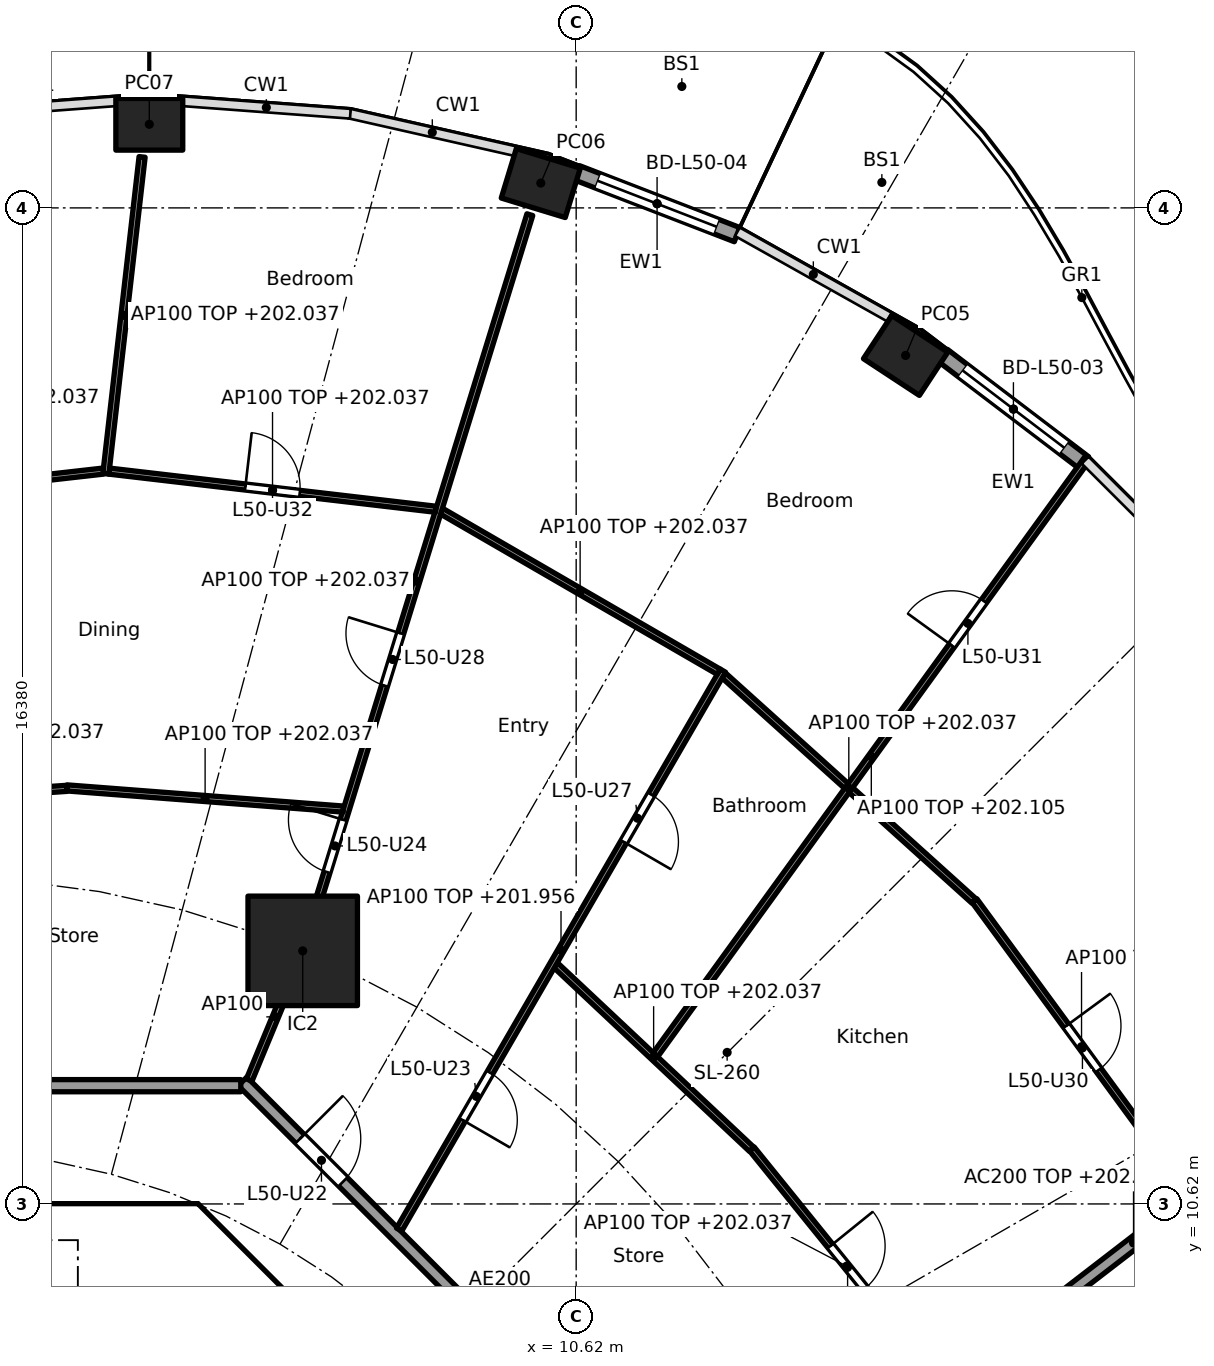
"""IFC4 building model, lengths in metres.
Left out: names, types, materials, properties, quantities, classifications, styles, units other than length and angle.
Written with IfcOpenShell. Run it as: python <this file> out.ifc"""

import sys

from ifc_helpers import new_model, si_unit, direction, frame, frame_2d, origin, origin_2d, place, context, subcontext, project, spatial, polyline, rectangle, hollow_rectangle, outline, extrude, element, fill, save


model = new_model("IFC4")
c1 = context("Model", 3, precision=1e-05, world=origin(), true_north=direction((0.0, 1.0)))
c2 = subcontext(c1, "Body", "Model", "MODEL_VIEW")
j1 = project(units=[si_unit("LENGTHUNIT", "METRE"), si_unit("PLANEANGLEUNIT", "RADIAN")], contexts=[c1])
p1 = place(None, origin())
s1 = spatial("IfcSite", under=j1, at=p1, CompositionType="ELEMENT")
p2 = place(p1, origin())
s2 = spatial("IfcBuilding", under=s1, at=p2, CompositionType="ELEMENT")
p3 = place(p2, frame((0.0, 0.0, 199.2)))
s3 = spatial("IfcBuildingStorey", under=s2, at=p3, CompositionType="ELEMENT", Elevation=199.2)
for number, where, z_axis, x_axis in (
    (1, (16.038, 24.573, 0.0), (0.0, 0.0, 1.0), (-0.836, 0.549, 0.0)),
    (2, (10.038, 27.408, 0.0), (0.0, 0.0, 1.0), (-0.957, 0.292, 0.0)),
    (3, (3.6, 28.375, 0.0), (0.0, 0.0, 1.0), (-1.0, 0.0, 0.0)),
):
    element("IfcColumn", number, at=place(p3, frame(where, z_axis=z_axis, x_axis=x_axis)), inside=s3, PredefinedType="COLUMN", context=c2, shape_type="SweptSolid", body=[
        extrude(hollow_rectangle(XDim=1.1, YDim=0.85, WallThickness=0.036, at=origin_2d()), origin(), (0.0, 0.0, 1.0), 3.7),
    ])
p4 = place(p3, frame((6.123, 14.782, 0.0), z_axis=(0.0, 0.0, 1.0), x_axis=(1.0, 0.0, 0.0)))
e4 = element("IfcColumn", 4, at=p4, inside=s3, PredefinedType="COLUMN", context=c2, shape_type="SweptSolid", body=[
    extrude(rectangle(XDim=1.8, YDim=1.8, at=origin_2d()), origin(), (0.0, 0.0, 1.0), 3.7),
])
p5 = place(p3, frame((16.65, 24.574, 0.0), z_axis=(0.0, 0.0, 1.0), x_axis=(0.796055733703, -0.60522332146, 0.0)))
e5 = element("IfcWall", 5, at=p5, inside=s3, PredefinedType="SOLIDWALL", context=c2, shape_type="SweptSolid", body=[
    extrude(rectangle(XDim=2.917, YDim=0.25, at=frame_2d((1.458, 0.0))), origin(), (0.0, 0.0, 1.0), 3.44),
])
p6 = place(p5, frame((0.408, 0.0, 0.0)))
e6 = element("IfcOpeningElement", 6, at=p6, cuts=e5, PredefinedType="OPENING", context=c2, shape_type="SweptSolid", body=[
    extrude(rectangle(XDim=2.1, YDim=2.4, at=frame_2d((1.05, 1.2))), frame((0.0, 0.135, 0.0), z_axis=(0.0, -1.0, 0.0), x_axis=(1.0, 0.0, 0.0)), (0.0, 0.0, 1.0), 0.27),
])
p7 = place(p3, frame((10.635, 27.576, 0.0), z_axis=(0.0, 0.0, 1.0), x_axis=(0.932806734513, -0.360377019311, 0.0)))
e7 = element("IfcWall", 7, at=p7, inside=s3, PredefinedType="SOLIDWALL", context=c2, shape_type="SweptSolid", body=[
    extrude(rectangle(XDim=2.82, YDim=0.25, at=frame_2d((1.41, 0.0))), origin(), (0.0, 0.0, 1.0), 3.44),
])
p8 = place(p7, frame((0.36, 0.0, 0.0)))
e8 = element("IfcOpeningElement", 8, at=p8, cuts=e7, PredefinedType="OPENING", context=c2, shape_type="SweptSolid", body=[
    extrude(rectangle(XDim=2.1, YDim=2.4, at=frame_2d((1.05, 1.2))), frame((0.0, 0.135, 0.0), z_axis=(0.0, -1.0, 0.0), x_axis=(1.0, 0.0, 0.0)), (0.0, 0.0, 1.0), 0.27),
])
p9 = place(p3, frame((9.988, 4.613, 0.0), z_axis=(0.0, 0.0, 1.0), x_axis=(-0.707106781187, 0.707106781187, 0.0)))
e9 = element("IfcWall", 9, at=p9, inside=s3, PredefinedType="SHEAR", context=c2, shape_type="SweptSolid", body=[
    extrude(rectangle(XDim=7.602, YDim=0.6, at=frame_2d((3.801, 0.0))), origin(), (0.0, 0.0, 1.0), 3.44),
])
p10 = place(p9, frame((3.201, 0.0, 0.0)))
e10 = element("IfcOpeningElement", 10, at=p10, cuts=e9, PredefinedType="OPENING", context=c2, shape_type="SweptSolid", body=[
    extrude(rectangle(XDim=1.2, YDim=2.1, at=frame_2d((0.6, 1.05))), frame((0.0, 0.31, 0.0), z_axis=(0.0, -1.0, 0.0), x_axis=(1.0, 0.0, 0.0)), (0.0, 0.0, 1.0), 0.62),
])
p11 = place(p3, frame((4.0, 7.025, 0.0), z_axis=(0.0, 0.0, 1.0), x_axis=(0.0, 1.0, 0.0)))
e11 = element("IfcWall", 11, at=p11, inside=s3, PredefinedType="SOLIDWALL", context=c2, shape_type="SweptSolid", body=[
    extrude(rectangle(XDim=3.0, YDim=0.2, at=frame_2d((1.5, 0.0))), origin(), (0.0, 0.0, 1.0), 3.44),
])
p12 = place(p11, frame((0.925, 0.0, 0.0)))
e12 = element("IfcOpeningElement", 12, at=p12, cuts=e11, PredefinedType="OPENING", context=c2, shape_type="SweptSolid", body=[
    extrude(rectangle(XDim=1.1, YDim=2.1, at=frame_2d((0.55, 1.05))), frame((0.0, 0.11, 0.0), z_axis=(0.0, -1.0, 0.0), x_axis=(1.0, 0.0, 0.0)), (0.0, 0.0, 1.0), 0.22),
])
p13 = place(p3, origin())
e13 = element("IfcWall", 13, at=p13, inside=s3, PredefinedType="SHEAR", context=c2, shape_type="SweptSolid", body=[
    extrude(outline(polyline([(-4.152, 10.025), (-4.401, 9.776), (-4.825, 10.2), (-4.401, 10.625), (4.401, 10.625), (4.825, 10.2), (4.401, 9.776), (4.152, 10.025), (-4.152, 10.025)])), origin(), (0.0, 0.0, 1.0), 3.44),
])
p14 = place(p3, frame((14.822, 6.154, 0.0), z_axis=(0.0, 0.0, 1.0), x_axis=(0.792203056092, 0.610257583254, 0.0)))
e14 = element("IfcWall", 14, at=p14, inside=s3, PredefinedType="PARTITIONING", context=c2, shape_type="SweptSolid", body=[
    extrude(rectangle(XDim=12.533, YDim=0.2, at=frame_2d((6.266, 0.0))), origin(), (0.0, 0.0, 1.0), 2.837),
])
p15 = place(p3, frame((12.635, 5.134, 0.0), z_axis=(0.0, 0.0, 1.0), x_axis=(-0.707106781187, 0.707106781187, 0.0)))
e15 = element("IfcWall", 15, at=p15, inside=s3, PredefinedType="PARTITIONING", context=c2, shape_type="SweptSolid", body=[
    extrude(rectangle(XDim=10.609, YDim=0.2, at=frame_2d((5.305, 0.0))), origin(), (0.0, 0.0, 1.0), 3.44),
])
p16 = place(p15, frame((8.274, 0.0, 0.0)))
e16 = element("IfcOpeningElement", 16, at=p16, cuts=e15, PredefinedType="OPENING", context=c2, shape_type="SweptSolid", body=[
    extrude(rectangle(XDim=1.0, YDim=2.1, at=frame_2d((0.5, 1.05))), frame((0.0, 0.11, 0.0), z_axis=(0.0, -1.0, 0.0), x_axis=(1.0, 0.0, 0.0)), (0.0, 0.0, 1.0), 0.22),
])
p17 = place(p3, frame((5.104, 12.565, 0.0), z_axis=(0.0, 0.0, 1.0), x_axis=(-1.0, 0.0, 0.0)))
e17 = element("IfcWall", 17, at=p17, inside=s3, PredefinedType="PARTITIONING", context=c2, shape_type="SweptSolid", body=[
    extrude(rectangle(XDim=10.409, YDim=0.2, at=frame_2d((5.205, 0.0))), origin(), (0.0, 0.0, 1.0), 3.44),
])
p18 = place(p3, frame((16.626, 7.67, 0.0), z_axis=(0.0, 0.0, 1.0), x_axis=(-0.628764602857, 0.777595700987, 0.0)))
e18 = element("IfcWall", 18, at=p18, inside=s3, PredefinedType="PARTITIONING", context=c2, shape_type="SweptSolid", body=[
    extrude(rectangle(XDim=4.957, YDim=0.1, at=frame_2d((2.479, 0.0))), origin(), (0.0, 0.0, 1.0), 2.837),
])
p19 = place(p18, frame((2.004, 0.0, 0.0)))
e19 = element("IfcOpeningElement", 19, at=p19, cuts=e18, PredefinedType="OPENING", context=c2, shape_type="SweptSolid", body=[
    extrude(rectangle(XDim=0.9, YDim=2.1, at=frame_2d((0.45, 1.05))), frame((0.0, 0.06, 0.0), z_axis=(0.0, -1.0, 0.0), x_axis=(1.0, 0.0, 0.0)), (0.0, 0.0, 1.0), 0.12),
])
p20 = place(p3, frame((20.692, 10.802, 0.0), z_axis=(0.0, 0.0, 1.0), x_axis=(-0.591122127251, 0.806582066918, 0.0)))
e20 = element("IfcWall", 20, at=p20, inside=s3, PredefinedType="PARTITIONING", context=c2, shape_type="SweptSolid", body=[
    extrude(rectangle(XDim=5.96, YDim=0.1, at=frame_2d((2.98, 0.0))), origin(), (0.0, 0.0, 1.0), 2.837),
])
p21 = place(p20, frame((2.505, 0.0, 0.0)))
e21 = element("IfcOpeningElement", 21, at=p21, cuts=e20, PredefinedType="OPENING", context=c2, shape_type="SweptSolid", body=[
    extrude(rectangle(XDim=0.9, YDim=2.1, at=frame_2d((0.45, 1.05))), frame((0.0, 0.06, 0.0), z_axis=(0.0, -1.0, 0.0), x_axis=(1.0, 0.0, 0.0)), (0.0, 0.0, 1.0), 0.12),
])
p22 = place(p3, frame((13.504, 11.52, 0.0), z_axis=(0.0, 0.0, 1.0), x_axis=(-0.728885663674, 0.684635442619, 0.0)))
e22 = element("IfcWall", 22, at=p22, inside=s3, PredefinedType="PARTITIONING", context=c2, shape_type="SweptSolid", body=[
    extrude(rectangle(XDim=4.419, YDim=0.1, at=frame_2d((2.21, 0.0))), origin(), (0.0, 0.0, 1.0), 2.837),
])
p23 = place(p3, frame((17.162, 15.603, 0.0), z_axis=(0.0, 0.0, 1.0), x_axis=(-0.742790086539, 0.66952437397, 0.0)))
e23 = element("IfcWall", 23, at=p23, inside=s3, PredefinedType="PARTITIONING", context=c2, shape_type="SweptSolid", body=[
    extrude(rectangle(XDim=5.542, YDim=0.1, at=frame_2d((2.771, 0.0))), origin(), (0.0, 0.0, 1.0), 2.837),
])
p24 = place(p3, frame((11.923, 13.073, 0.0), z_axis=(0.0, 0.0, 1.0), x_axis=(0.586643945506, 0.809844973561, 0.0)))
e24 = element("IfcWall", 24, at=p24, inside=s3, PredefinedType="PARTITIONING", context=c2, shape_type="SweptSolid", body=[
    extrude(rectangle(XDim=12.104, YDim=0.1, at=frame_2d((6.052, 0.0))), origin(), (0.0, 0.0, 1.0), 2.905),
])
p25 = place(p24, frame((8.31, 0.0, 0.0)))
e25 = element("IfcOpeningElement", 25, at=p25, cuts=e24, PredefinedType="OPENING", context=c2, shape_type="SweptSolid", body=[
    extrude(rectangle(XDim=0.9, YDim=2.1, at=frame_2d((0.45, 1.05))), frame((0.0, 0.06, 0.0), z_axis=(0.0, -1.0, 0.0), x_axis=(1.0, 0.0, 0.0)), (0.0, 0.0, 1.0), 0.12),
])
p26 = place(p3, frame((7.708, 10.198, 0.0), z_axis=(0.0, 0.0, 1.0), x_axis=(0.501288100085, 0.865280440501, 0.0)))
e26 = element("IfcWall", 26, at=p26, inside=s3, PredefinedType="PARTITIONING", context=c2, shape_type="SweptSolid", body=[
    extrude(rectangle(XDim=10.623, YDim=0.1, at=frame_2d((5.312, 0.0))), origin(), (0.0, 0.0, 1.0), 2.756),
])
p27 = place(p26, frame((2.082, 0.0, 0.0)))
e27 = element("IfcOpeningElement", 27, at=p27, cuts=e26, PredefinedType="OPENING", context=c2, shape_type="SweptSolid", body=[
    extrude(rectangle(XDim=0.9, YDim=2.1, at=frame_2d((0.45, 1.05))), frame((0.0, 0.06, 0.0), z_axis=(0.0, -1.0, 0.0), x_axis=(1.0, 0.0, 0.0)), (0.0, 0.0, 1.0), 0.12),
])
p28 = place(p26, frame((7.369, 0.0, 0.0)))
e28 = element("IfcOpeningElement", 28, at=p28, cuts=e26, PredefinedType="OPENING", context=c2, shape_type="SweptSolid", body=[
    extrude(rectangle(XDim=0.9, YDim=2.1, at=frame_2d((0.45, 1.05))), frame((0.0, 0.06, 0.0), z_axis=(0.0, -1.0, 0.0), x_axis=(1.0, 0.0, 0.0)), (0.0, 0.0, 1.0), 0.12),
])
p29 = place(p3, frame((12.965, 19.371, 0.0), z_axis=(0.0, 0.0, 1.0), x_axis=(-0.865277177388, 0.501293732547, 0.0)))
e29 = element("IfcWall", 29, at=p29, inside=s3, PredefinedType="PARTITIONING", context=c2, shape_type="SweptSolid", body=[
    extrude(rectangle(XDim=5.27, YDim=0.1, at=frame_2d((2.635, 0.0))), origin(), (0.0, 0.0, 1.0), 2.837),
])
p30 = place(p3, frame((5.243, 12.657, 0.0), z_axis=(0.0, 0.0, 1.0), x_axis=(0.382719158442, 0.923864733477, 0.0)))
e30 = element("IfcWall", 30, at=p30, inside=s3, PredefinedType="PARTITIONING", context=c2, shape_type="SweptSolid", body=[
    extrude(rectangle(XDim=2.25, YDim=0.1, at=frame_2d((1.125, 0.0))), origin(), (0.0, 0.0, 1.0), 3.44),
])
p31 = place(p3, frame((6.138, 14.83, 0.0), z_axis=(0.0, 0.0, 1.0), x_axis=(0.294818517221, 0.955553264818, 0.0)))
e31 = element("IfcWall", 31, at=p31, inside=s3, PredefinedType="PARTITIONING", context=c2, shape_type="SweptSolid", body=[
    extrude(rectangle(XDim=12.619, YDim=0.1, at=frame_2d((6.31, 0.0))), origin(), (0.0, 0.0, 1.0), 2.837),
])
p32 = place(p31, frame((1.306, 0.0, 0.0)))
e32 = element("IfcOpeningElement", 32, at=p32, cuts=e31, PredefinedType="OPENING", context=c2, shape_type="SweptSolid", body=[
    extrude(rectangle(XDim=0.9, YDim=2.1, at=frame_2d((0.45, 1.05))), frame((0.0, 0.06, 0.0), z_axis=(0.0, -1.0, 0.0), x_axis=(1.0, 0.0, 0.0)), (0.0, 0.0, 1.0), 0.12),
])
p33 = place(p31, frame((4.515, 0.0, 0.0)))
e33 = element("IfcOpeningElement", 33, at=p33, cuts=e31, PredefinedType="OPENING", context=c2, shape_type="SweptSolid", body=[
    extrude(rectangle(XDim=0.9, YDim=2.1, at=frame_2d((0.45, 1.05))), frame((0.0, 0.06, 0.0), z_axis=(0.0, -1.0, 0.0), x_axis=(1.0, 0.0, 0.0)), (0.0, 0.0, 1.0), 0.12),
])
p34 = place(p3, frame((6.791, 17.113, 0.0), z_axis=(0.0, 0.0, 1.0), x_axis=(-0.997077117727, 0.07640171009, 0.0)))
e34 = element("IfcWall", 34, at=p34, inside=s3, PredefinedType="PARTITIONING", context=c2, shape_type="SweptSolid", body=[
    extrude(rectangle(XDim=4.56, YDim=0.1, at=frame_2d((2.28, 0.0))), origin(), (0.0, 0.0, 1.0), 2.837),
])
p35 = place(p3, frame((8.312, 22.044, 0.0), z_axis=(0.0, 0.0, 1.0), x_axis=(-0.993245806382, 0.1160291692, 0.0)))
e35 = element("IfcWall", 35, at=p35, inside=s3, PredefinedType="PARTITIONING", context=c2, shape_type="SweptSolid", body=[
    extrude(rectangle(XDim=5.408, YDim=0.1, at=frame_2d((2.704, 0.0))), origin(), (0.0, 0.0, 1.0), 2.837),
])
p36 = place(p35, frame((2.254, 0.0, 0.0)))
e36 = element("IfcOpeningElement", 36, at=p36, cuts=e35, PredefinedType="OPENING", context=c2, shape_type="SweptSolid", body=[
    extrude(rectangle(XDim=0.9, YDim=2.1, at=frame_2d((0.45, 1.05))), frame((0.0, 0.06, 0.0), z_axis=(0.0, -1.0, 0.0), x_axis=(1.0, 0.0, 0.0)), (0.0, 0.0, 1.0), 0.12),
])
p37 = place(p3, frame((2.244, 17.455, 0.0), z_axis=(0.0, 0.0, 1.0), x_axis=(-0.997754717554, -0.066974051687, 0.0)))
e37 = element("IfcWall", 37, at=p37, inside=s3, PredefinedType="PARTITIONING", context=c2, shape_type="SweptSolid", body=[
    extrude(rectangle(XDim=4.309, YDim=0.1, at=frame_2d((2.154, 0.0))), origin(), (0.0, 0.0, 1.0), 2.837),
])
p38 = place(p3, frame((2.885, 22.627, 0.0), z_axis=(0.0, 0.0, 1.0), x_axis=(0.113634556485, 0.993522615531, 0.0)))
e38 = element("IfcWall", 38, at=p38, inside=s3, PredefinedType="PARTITIONING", context=c2, shape_type="SweptSolid", body=[
    extrude(rectangle(XDim=5.244, YDim=0.1, at=frame_2d((2.622, 0.0))), origin(), (0.0, 0.0, 1.0), 2.837),
])
p39 = place(p3, frame((2.842, 22.671, 0.0), z_axis=(0.0, 0.0, 1.0), x_axis=(-0.993660315081, -0.112424099879, 0.0)))
e39 = element("IfcWall", 39, at=p39, inside=s3, PredefinedType="PARTITIONING", context=c2, shape_type="SweptSolid", body=[
    extrude(rectangle(XDim=5.325, YDim=0.1, at=frame_2d((2.662, 0.0))), origin(), (0.0, 0.0, 1.0), 2.837),
])
p40 = place(p39, frame((2.212, 0.0, 0.0)))
e40 = element("IfcOpeningElement", 40, at=p40, cuts=e39, PredefinedType="OPENING", context=c2, shape_type="SweptSolid", body=[
    extrude(rectangle(XDim=0.9, YDim=2.1, at=frame_2d((0.45, 1.05))), frame((0.0, 0.06, 0.0), z_axis=(0.0, -1.0, 0.0), x_axis=(1.0, 0.0, 0.0)), (0.0, 0.0, 1.0), 0.12),
])
p41 = place(p6, origin())
e41 = element("IfcDoor", 41, at=p41, inside=s3, OperationType="SLIDING_TO_LEFT", PredefinedType="DOOR", context=c2, shape_type="SweptSolid", body=[
    extrude(rectangle(XDim=2.1, YDim=2.4, at=frame_2d((1.05, 1.2))), frame((0.0, 0.025, 0.0), z_axis=(0.0, -1.0, 0.0), x_axis=(1.0, 0.0, 0.0)), (0.0, 0.0, 1.0), 0.05),
])
fill(e6, e41)
p42 = place(p8, origin())
e42 = element("IfcDoor", 42, at=p42, inside=s3, OperationType="SLIDING_TO_LEFT", PredefinedType="DOOR", context=c2, shape_type="SweptSolid", body=[
    extrude(rectangle(XDim=2.1, YDim=2.4, at=frame_2d((1.05, 1.2))), frame((0.0, 0.025, 0.0), z_axis=(0.0, -1.0, 0.0), x_axis=(1.0, 0.0, 0.0)), (0.0, 0.0, 1.0), 0.05),
])
fill(e8, e42)
p43 = place(p16, frame((1.0, 0.0, 0.0), x_axis=(-1.0, 0.0, 0.0)))
e43 = element("IfcDoor", 43, at=p43, inside=s3, OperationType="SINGLE_SWING_LEFT", PredefinedType="DOOR", context=c2, shape_type="SweptSolid", body=[
    extrude(rectangle(XDim=1.0, YDim=2.1, at=frame_2d((0.5, 1.05))), frame((0.0, 0.025, 0.0), z_axis=(0.0, -1.0, 0.0), x_axis=(1.0, 0.0, 0.0)), (0.0, 0.0, 1.0), 0.05),
])
fill(e16, e43)
p44 = place(p27, frame((0.9, 0.0, 0.0), x_axis=(-1.0, 0.0, 0.0)))
e44 = element("IfcDoor", 44, at=p44, inside=s3, OperationType="SINGLE_SWING_RIGHT", PredefinedType="DOOR", context=c2, shape_type="SweptSolid", body=[
    extrude(rectangle(XDim=0.9, YDim=2.1, at=frame_2d((0.45, 1.05))), frame((0.0, 0.025, 0.0), z_axis=(0.0, -1.0, 0.0), x_axis=(1.0, 0.0, 0.0)), (0.0, 0.0, 1.0), 0.05),
])
fill(e27, e44)
p45 = place(p32, origin())
e45 = element("IfcDoor", 45, at=p45, inside=s3, OperationType="SINGLE_SWING_RIGHT", PredefinedType="DOOR", context=c2, shape_type="SweptSolid", body=[
    extrude(rectangle(XDim=0.9, YDim=2.1, at=frame_2d((0.45, 1.05))), frame((0.0, 0.025, 0.0), z_axis=(0.0, -1.0, 0.0), x_axis=(1.0, 0.0, 0.0)), (0.0, 0.0, 1.0), 0.05),
])
fill(e32, e45)
p46 = place(p19, frame((0.9, 0.0, 0.0), x_axis=(-1.0, 0.0, 0.0)))
e46 = element("IfcDoor", 46, at=p46, inside=s3, OperationType="SINGLE_SWING_LEFT", PredefinedType="DOOR", context=c2, shape_type="SweptSolid", body=[
    extrude(rectangle(XDim=0.9, YDim=2.1, at=frame_2d((0.45, 1.05))), frame((0.0, 0.025, 0.0), z_axis=(0.0, -1.0, 0.0), x_axis=(1.0, 0.0, 0.0)), (0.0, 0.0, 1.0), 0.05),
])
fill(e19, e46)
p47 = place(p28, frame((0.9, 0.0, 0.0), x_axis=(-1.0, 0.0, 0.0)))
e47 = element("IfcDoor", 47, at=p47, inside=s3, OperationType="SINGLE_SWING_RIGHT", PredefinedType="DOOR", context=c2, shape_type="SweptSolid", body=[
    extrude(rectangle(XDim=0.9, YDim=2.1, at=frame_2d((0.45, 1.05))), frame((0.0, 0.025, 0.0), z_axis=(0.0, -1.0, 0.0), x_axis=(1.0, 0.0, 0.0)), (0.0, 0.0, 1.0), 0.05),
])
fill(e28, e47)
p48 = place(p33, origin())
e48 = element("IfcDoor", 48, at=p48, inside=s3, OperationType="SINGLE_SWING_RIGHT", PredefinedType="DOOR", context=c2, shape_type="SweptSolid", body=[
    extrude(rectangle(XDim=0.9, YDim=2.1, at=frame_2d((0.45, 1.05))), frame((0.0, 0.025, 0.0), z_axis=(0.0, -1.0, 0.0), x_axis=(1.0, 0.0, 0.0)), (0.0, 0.0, 1.0), 0.05),
])
fill(e33, e48)
p49 = place(p21, frame((0.9, 0.0, 0.0), x_axis=(-1.0, 0.0, 0.0)))
e49 = element("IfcDoor", 49, at=p49, inside=s3, OperationType="SINGLE_SWING_LEFT", PredefinedType="DOOR", context=c2, shape_type="SweptSolid", body=[
    extrude(rectangle(XDim=0.9, YDim=2.1, at=frame_2d((0.45, 1.05))), frame((0.0, 0.025, 0.0), z_axis=(0.0, -1.0, 0.0), x_axis=(1.0, 0.0, 0.0)), (0.0, 0.0, 1.0), 0.05),
])
fill(e21, e49)
p50 = place(p25, origin())
e50 = element("IfcDoor", 50, at=p50, inside=s3, OperationType="SINGLE_SWING_LEFT", PredefinedType="DOOR", context=c2, shape_type="SweptSolid", body=[
    extrude(rectangle(XDim=0.9, YDim=2.1, at=frame_2d((0.45, 1.05))), frame((0.0, 0.025, 0.0), z_axis=(0.0, -1.0, 0.0), x_axis=(1.0, 0.0, 0.0)), (0.0, 0.0, 1.0), 0.05),
])
fill(e25, e50)
p51 = place(p36, frame((0.9, 0.0, 0.0), x_axis=(-1.0, 0.0, 0.0)))
e51 = element("IfcDoor", 51, at=p51, inside=s3, OperationType="SINGLE_SWING_LEFT", PredefinedType="DOOR", context=c2, shape_type="SweptSolid", body=[
    extrude(rectangle(XDim=0.9, YDim=2.1, at=frame_2d((0.45, 1.05))), frame((0.0, 0.025, 0.0), z_axis=(0.0, -1.0, 0.0), x_axis=(1.0, 0.0, 0.0)), (0.0, 0.0, 1.0), 0.05),
])
fill(e36, e51)
save(model, sys.argv[1])
